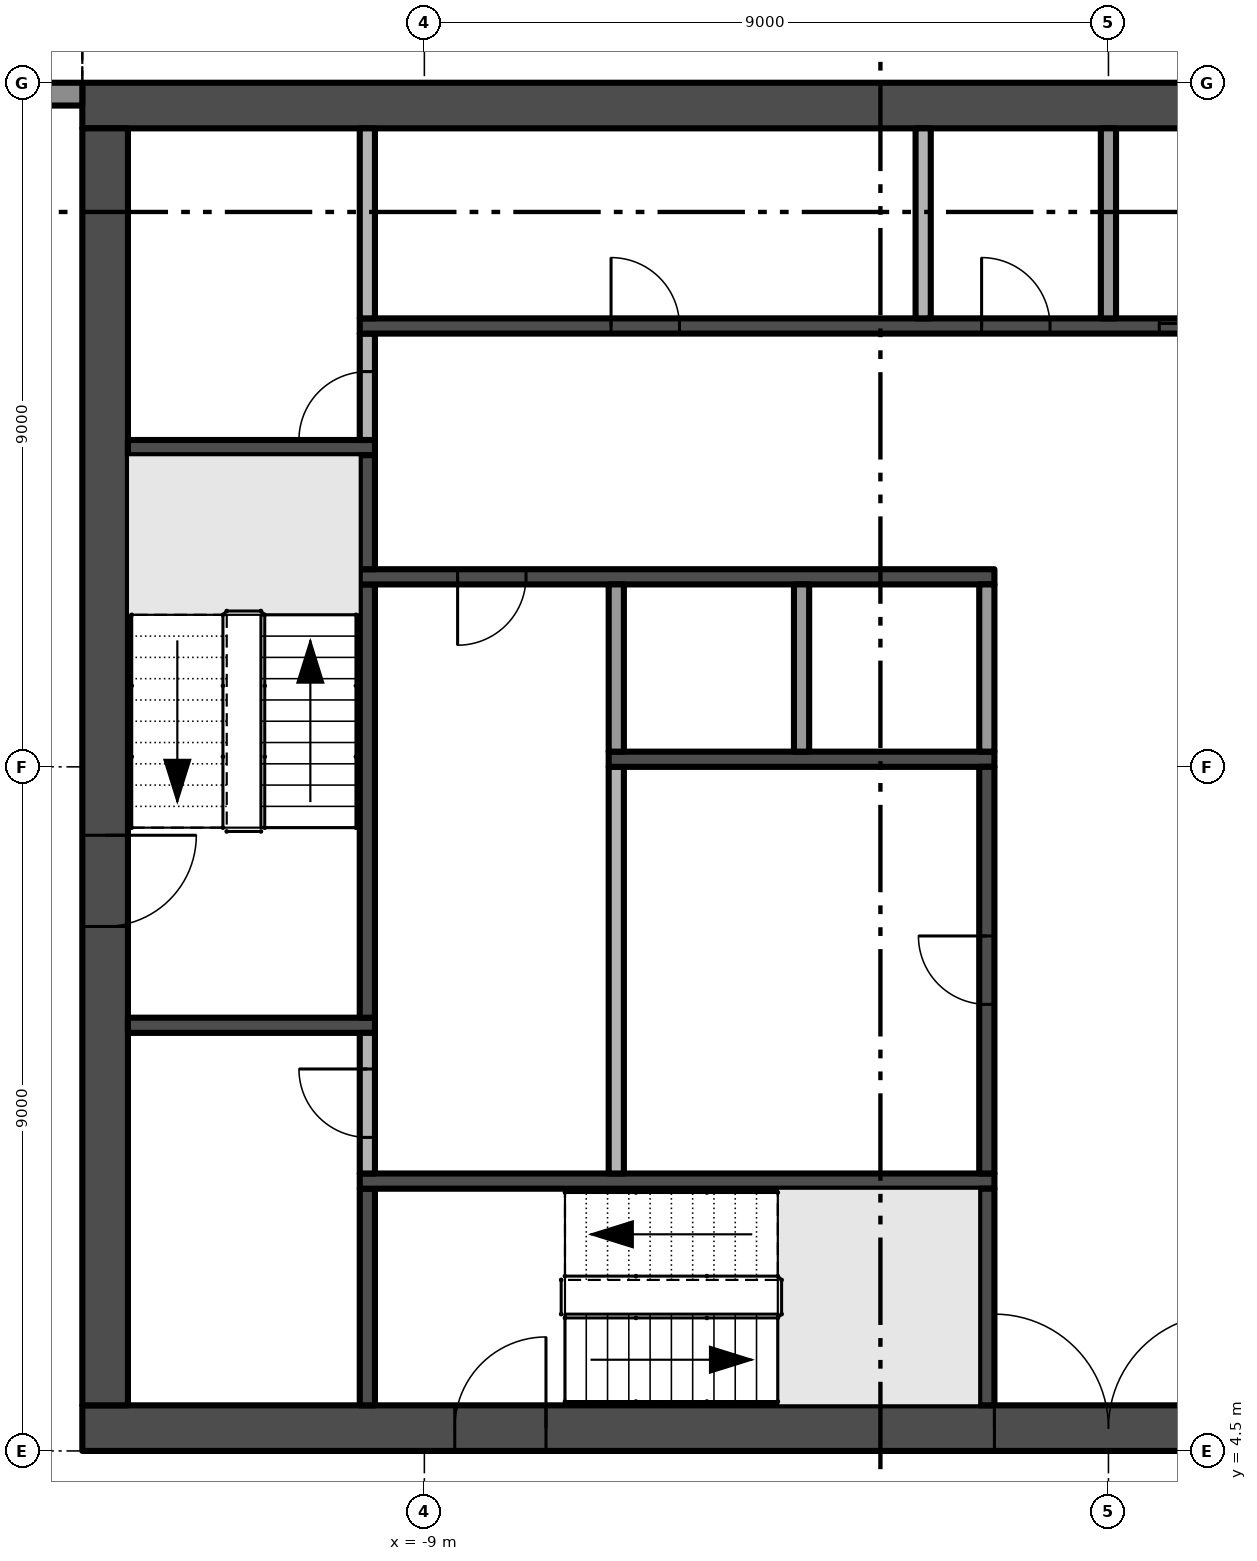
"""IFC4 building model, lengths in metres.
Left out: names, types, materials, properties, quantities, classifications, styles, units other than length and angle.
Written with IfcOpenShell. Run it as: python <this file> out.ifc"""

import sys

from ifc_helpers import new_model, si_unit, direction, frame, frame_2d, origin, place, context, subcontext, project, spatial, polyline, rectangle, outline, extrude, element, fill, save


model = new_model("IFC4")
c1 = context("Model", 3, precision=1e-05, world=origin(), true_north=direction((0.0, 1.0)))
c2 = subcontext(c1, "Body", "Model", "MODEL_VIEW")
j1 = project(units=[si_unit("LENGTHUNIT", "METRE"), si_unit("PLANEANGLEUNIT", "RADIAN")], contexts=[c1])
p1 = place(None, origin())
s1 = spatial("IfcSite", under=j1, at=p1, CompositionType="ELEMENT")
p2 = place(p1, origin())
s2 = spatial("IfcBuilding", under=s1, at=p2, CompositionType="ELEMENT")
p3 = place(p2, frame((0.0, 0.0, 184.4)))
s3 = spatial("IfcBuildingStorey", under=s2, at=p3, CompositionType="ELEMENT", Elevation=184.4)
p4 = place(p3, frame((-13.5, 4.8, -0.3), z_axis=(0.0, 0.0, 1.0), x_axis=(1.0, 0.0, 0.0)))
e1 = element("IfcWall", 1, at=p4, inside=s3, PredefinedType="SHEAR", context=c2, shape_type="SweptSolid", body=[
    extrude(rectangle(XDim=27.0, YDim=0.6, at=frame_2d((13.5, 0.0))), origin(), (0.0, 0.0, 1.0), 3.8),
])
p5 = place(p4, frame((12.0, 0.0, 0.3)))
e2 = element("IfcOpeningElement", 2, at=p5, cuts=e1, PredefinedType="OPENING", context=c2, shape_type="SweptSolid", body=[
    extrude(rectangle(XDim=3.0, YDim=2.4, at=frame_2d((1.5, 1.2))), frame((0.0, 0.31, 0.0), z_axis=(0.0, -1.0, 0.0), x_axis=(1.0, 0.0, 0.0)), (0.0, 0.0, 1.0), 0.62),
])
p6 = place(p4, frame((4.9, 0.0, 0.3)))
e3 = element("IfcOpeningElement", 3, at=p6, cuts=e1, PredefinedType="OPENING", context=c2, shape_type="SweptSolid", body=[
    extrude(rectangle(XDim=1.2, YDim=2.2, at=frame_2d((0.6, 1.1))), frame((0.0, 0.31, 0.0), z_axis=(0.0, -1.0, 0.0), x_axis=(1.0, 0.0, 0.0)), (0.0, 0.0, 1.0), 0.62),
])
p7 = place(p4, frame((20.75, 0.0, 0.3)))
e4 = element("IfcOpeningElement", 4, at=p7, cuts=e1, PredefinedType="OPENING", context=c2, shape_type="SweptSolid", body=[
    extrude(rectangle(XDim=1.5, YDim=2.2, at=frame_2d((0.75, 1.1))), frame((0.0, 0.31, 0.0), z_axis=(0.0, -1.0, 0.0), x_axis=(1.0, 0.0, 0.0)), (0.0, 0.0, 1.0), 0.62),
])
p8 = place(p4, frame((17.4, 0.0, 0.3)))
e5 = element("IfcOpeningElement", 5, at=p8, cuts=e1, PredefinedType="OPENING", context=c2, shape_type="SweptSolid", body=[
    extrude(rectangle(XDim=1.2, YDim=2.2, at=frame_2d((0.6, 1.1))), frame((0.0, 0.31, 0.0), z_axis=(0.0, -1.0, 0.0), x_axis=(1.0, 0.0, 0.0)), (0.0, 0.0, 1.0), 0.62),
])
p9 = place(p3, frame((13.5, 22.2, -0.3), z_axis=(0.0, 0.0, 1.0), x_axis=(-1.0, 0.0, 0.0)))
e6 = element("IfcWall", 6, at=p9, inside=s3, PredefinedType="SHEAR", context=c2, shape_type="SweptSolid", body=[
    extrude(rectangle(XDim=27.0, YDim=0.6, at=frame_2d((13.5, 0.0))), origin(), (0.0, 0.0, 1.0), 3.8),
])
p10 = place(p3, frame((-13.2, 21.9, -0.3), z_axis=(0.0, 0.0, 1.0), x_axis=(0.0, -1.0, 0.0)))
e7 = element("IfcWall", 7, at=p10, inside=s3, PredefinedType="SHEAR", context=c2, shape_type="SweptSolid", body=[
    extrude(rectangle(XDim=16.8, YDim=0.6, at=frame_2d((8.4, 0.0))), origin(), (0.0, 0.0, 1.0), 3.8),
])
p11 = place(p10, frame((9.3, 0.0, 0.3)))
e8 = element("IfcOpeningElement", 8, at=p11, cuts=e7, PredefinedType="OPENING", context=c2, shape_type="SweptSolid", body=[
    extrude(rectangle(XDim=1.2, YDim=2.2, at=frame_2d((0.6, 1.1))), frame((0.0, 0.31, 0.0), z_axis=(0.0, -1.0, 0.0), x_axis=(1.0, 0.0, 0.0)), (0.0, 0.0, 1.0), 0.62),
])
p12 = place(p3, frame((-17.475, 22.35, 0.0), z_axis=(0.0, 0.0, 1.0), x_axis=(1.0, 0.0, 0.0)))
e9 = element("IfcWall", 9, at=p12, inside=s3, PredefinedType="SOLIDWALL", context=c2, shape_type="SweptSolid", body=[
    extrude(rectangle(XDim=3.975, YDim=0.3, at=frame_2d((1.988, 0.0))), origin(), (0.0, 0.0, 1.0), 3.5),
])
p13 = place(p12, frame((0.325, 0.0, 0.0)))
e10 = element("IfcOpeningElement", 10, at=p13, cuts=e9, PredefinedType="OPENING", context=c2, shape_type="SweptSolid", body=[
    extrude(rectangle(XDim=3.025, YDim=2.4, at=frame_2d((1.512, 1.2))), frame((0.0, 0.16, 0.0), z_axis=(0.0, -1.0, 0.0), x_axis=(1.0, 0.0, 0.0)), (0.0, 0.0, 1.0), 0.32),
])
p14 = place(p3, origin())
e11 = element("IfcWall", 11, at=p14, inside=s3, PredefinedType="USERDEFINED", context=c2, shape_type="SweptSolid", body=[
    extrude(outline(polyline([(-13.5, 25.149), (-15.0, 25.485), (-15.375, 25.5), (-16.5, 25.369), (-18.0, 24.845), (-19.5, 24.112), (-21.0, 23.451), (-22.5, 23.115), (-22.445, 22.871), (-20.921, 23.213), (-19.395, 23.885), (-17.904, 24.614), (-16.444, 25.124), (-15.365, 25.249), (-15.033, 25.236), (-13.555, 24.905), (-13.5, 25.149)])), origin(), (0.0, 0.0, 1.0), 0.9),
])
for number, where, z_axis, x_axis in (
    (12, (-12.9, 10.1, 0.0), (0.0, 0.0, 1.0), (1.0, 0.0, 0.0)),
    (13, (-12.9, 17.7, 0.0), (0.0, 0.0, 1.0), (1.0, 0.0, 0.0)),
):
    element("IfcWall", number, at=place(p3, frame(where, z_axis=z_axis, x_axis=x_axis)), inside=s3, PredefinedType="SHEAR", context=c2, shape_type="SweptSolid", body=[
        extrude(rectangle(XDim=3.25, YDim=0.2, at=frame_2d((1.625, 0.0))), origin(), (0.0, 0.0, 1.0), 3.5),
    ])
p15 = place(p3, frame((-9.75, 5.1, 0.0), z_axis=(0.0, 0.0, 1.0), x_axis=(0.0, 1.0, 0.0)))
e14 = element("IfcWall", 14, at=p15, inside=s3, PredefinedType="SHEAR", context=c2, shape_type="SweptSolid", body=[
    extrude(rectangle(XDim=2.85, YDim=0.2, at=frame_2d((1.425, 0.0))), origin(), (0.0, 0.0, 1.0), 3.5),
])
p16 = place(p3, frame((-9.85, 8.05, 0.0), z_axis=(0.0, 0.0, 1.0), x_axis=(1.0, 0.0, 0.0)))
e15 = element("IfcWall", 15, at=p16, inside=s3, PredefinedType="SHEAR", context=c2, shape_type="SweptSolid", body=[
    extrude(rectangle(XDim=8.35, YDim=0.2, at=frame_2d((4.175, 0.0))), origin(), (0.0, 0.0, 1.0), 3.5),
])
p17 = place(p3, frame((-9.75, 8.15, 0.0), z_axis=(0.0, 0.0, 1.0), x_axis=(0.0, 1.0, 0.0)))
e16 = element("IfcWall", 16, at=p17, inside=s3, PredefinedType="PARTITIONING", context=c2, shape_type="SweptSolid", body=[
    extrude(rectangle(XDim=1.85, YDim=0.2, at=frame_2d((0.925, 0.0))), origin(), (0.0, 0.0, 1.0), 3.5),
])
p18 = place(p17, frame((0.475, 0.0, 0.0)))
e17 = element("IfcOpeningElement", 17, at=p18, cuts=e16, PredefinedType="OPENING", context=c2, shape_type="SweptSolid", body=[
    extrude(rectangle(XDim=0.9, YDim=2.1, at=frame_2d((0.45, 1.05))), frame((0.0, 0.11, 0.0), z_axis=(0.0, -1.0, 0.0), x_axis=(1.0, 0.0, 0.0)), (0.0, 0.0, 1.0), 0.22),
])
p19 = place(p3, frame((-9.75, 10.2, 0.0), z_axis=(0.0, 0.0, 1.0), x_axis=(0.0, 1.0, 0.0)))
e18 = element("IfcWall", 18, at=p19, inside=s3, PredefinedType="SHEAR", context=c2, shape_type="SweptSolid", body=[
    extrude(rectangle(XDim=5.7, YDim=0.2, at=frame_2d((2.85, 0.0))), origin(), (0.0, 0.0, 1.0), 3.5),
])
p20 = place(p3, frame((-1.5, 16.0, 0.0), z_axis=(0.0, 0.0, 1.0), x_axis=(-1.0, 0.0, 0.0)))
e19 = element("IfcWall", 19, at=p20, inside=s3, PredefinedType="SHEAR", context=c2, shape_type="SweptSolid", body=[
    extrude(rectangle(XDim=8.35, YDim=0.2, at=frame_2d((4.175, 0.0))), origin(), (0.0, 0.0, 1.0), 3.5),
])
p21 = place(p20, frame((6.162, 0.0, 0.0)))
e20 = element("IfcOpeningElement", 20, at=p21, cuts=e19, PredefinedType="OPENING", context=c2, shape_type="SweptSolid", body=[
    extrude(rectangle(XDim=0.9, YDim=2.1, at=frame_2d((0.45, 1.05))), frame((0.0, 0.11, 0.0), z_axis=(0.0, -1.0, 0.0), x_axis=(1.0, 0.0, 0.0)), (0.0, 0.0, 1.0), 0.22),
])
p22 = place(p3, frame((-9.75, 16.1, 0.0), z_axis=(0.0, 0.0, 1.0), x_axis=(0.0, 1.0, 0.0)))
e21 = element("IfcWall", 21, at=p22, inside=s3, PredefinedType="SHEAR", context=c2, shape_type="SweptSolid", body=[
    extrude(rectangle(XDim=1.5, YDim=0.2, at=frame_2d((0.75, 0.0))), origin(), (0.0, 0.0, 1.0), 3.5),
])
p23 = place(p3, frame((-9.75, 17.8, 0.0), z_axis=(0.0, 0.0, 1.0), x_axis=(0.0, 1.0, 0.0)))
e22 = element("IfcWall", 22, at=p23, inside=s3, PredefinedType="PARTITIONING", context=c2, shape_type="SweptSolid", body=[
    extrude(rectangle(XDim=1.4, YDim=0.2, at=frame_2d((0.7, 0.0))), origin(), (0.0, 0.0, 1.0), 3.5),
])
p24 = place(p23, origin())
e23 = element("IfcOpeningElement", 23, at=p24, cuts=e22, PredefinedType="OPENING", context=c2, shape_type="SweptSolid", body=[
    extrude(rectangle(XDim=0.9, YDim=2.1, at=frame_2d((0.45, 1.05))), frame((0.0, 0.11, 0.0), z_axis=(0.0, -1.0, 0.0), x_axis=(1.0, 0.0, 0.0)), (0.0, 0.0, 1.0), 0.22),
])
p25 = place(p3, frame((-9.85, 19.3, 0.0), z_axis=(0.0, 0.0, 1.0), x_axis=(1.0, 0.0, 0.0)))
e24 = element("IfcWall", 24, at=p25, inside=s3, PredefinedType="SHEAR", context=c2, shape_type="SweptSolid", body=[
    extrude(rectangle(XDim=19.7, YDim=0.2, at=frame_2d((9.85, 0.0))), origin(), (0.0, 0.0, 1.0), 3.5),
])
p26 = place(p25, frame((10.519, 0.0, 0.0)))
e25 = element("IfcOpeningElement", 25, at=p26, cuts=e24, PredefinedType="OPENING", context=c2, shape_type="SweptSolid", body=[
    extrude(rectangle(XDim=1.1, YDim=2.1, at=frame_2d((0.55, 1.05))), frame((0.0, 0.11, 0.0), z_axis=(0.0, -1.0, 0.0), x_axis=(1.0, 0.0, 0.0)), (0.0, 0.0, 1.0), 0.22),
])
p27 = place(p25, frame((12.956, 0.0, 0.0)))
e26 = element("IfcOpeningElement", 26, at=p27, cuts=e24, PredefinedType="OPENING", context=c2, shape_type="SweptSolid", body=[
    extrude(rectangle(XDim=1.1, YDim=2.1, at=frame_2d((0.55, 1.05))), frame((0.0, 0.11, 0.0), z_axis=(0.0, -1.0, 0.0), x_axis=(1.0, 0.0, 0.0)), (0.0, 0.0, 1.0), 0.22),
])
p28 = place(p25, frame((15.394, 0.0, 0.0)))
e27 = element("IfcOpeningElement", 27, at=p28, cuts=e24, PredefinedType="OPENING", context=c2, shape_type="SweptSolid", body=[
    extrude(rectangle(XDim=1.1, YDim=2.1, at=frame_2d((0.55, 1.05))), frame((0.0, 0.11, 0.0), z_axis=(0.0, -1.0, 0.0), x_axis=(1.0, 0.0, 0.0)), (0.0, 0.0, 1.0), 0.22),
])
p29 = place(p25, frame((17.831, 0.0, 0.0)))
e28 = element("IfcOpeningElement", 28, at=p29, cuts=e24, PredefinedType="OPENING", context=c2, shape_type="SweptSolid", body=[
    extrude(rectangle(XDim=1.1, YDim=2.1, at=frame_2d((0.55, 1.05))), frame((0.0, 0.11, 0.0), z_axis=(0.0, -1.0, 0.0), x_axis=(1.0, 0.0, 0.0)), (0.0, 0.0, 1.0), 0.22),
])
p30 = place(p25, frame((3.306, 0.0, 0.0)))
e29 = element("IfcOpeningElement", 29, at=p30, cuts=e24, PredefinedType="OPENING", context=c2, shape_type="SweptSolid", body=[
    extrude(rectangle(XDim=0.9, YDim=2.1, at=frame_2d((0.45, 1.05))), frame((0.0, 0.11, 0.0), z_axis=(0.0, -1.0, 0.0), x_axis=(1.0, 0.0, 0.0)), (0.0, 0.0, 1.0), 0.22),
])
p31 = place(p25, frame((8.181, 0.0, 0.0)))
e30 = element("IfcOpeningElement", 30, at=p31, cuts=e24, PredefinedType="OPENING", context=c2, shape_type="SweptSolid", body=[
    extrude(rectangle(XDim=0.9, YDim=2.1, at=frame_2d((0.45, 1.05))), frame((0.0, 0.11, 0.0), z_axis=(0.0, -1.0, 0.0), x_axis=(1.0, 0.0, 0.0)), (0.0, 0.0, 1.0), 0.22),
])
p32 = place(p3, frame((-9.75, 19.4, 0.0), z_axis=(0.0, 0.0, 1.0), x_axis=(0.0, 1.0, 0.0)))
e31 = element("IfcWall", 31, at=p32, inside=s3, PredefinedType="PARTITIONING", context=c2, shape_type="SweptSolid", body=[
    extrude(rectangle(XDim=2.5, YDim=0.2, at=frame_2d((1.25, 0.0))), origin(), (0.0, 0.0, 1.0), 3.5),
])
p33 = place(p3, frame((-6.475, 8.15, 0.0), z_axis=(0.0, 0.0, 1.0), x_axis=(0.0, 1.0, 0.0)))
e32 = element("IfcWall", 32, at=p33, inside=s3, PredefinedType="PARTITIONING", context=c2, shape_type="SweptSolid", body=[
    extrude(rectangle(XDim=5.35, YDim=0.2, at=frame_2d((2.675, 0.0))), origin(), (0.0, 0.0, 1.0), 3.5),
])
p34 = place(p3, frame((-6.575, 13.6, 0.0), z_axis=(0.0, 0.0, 1.0), x_axis=(1.0, 0.0, 0.0)))
e33 = element("IfcWall", 33, at=p34, inside=s3, PredefinedType="SHEAR", context=c2, shape_type="SweptSolid", body=[
    extrude(rectangle(XDim=5.075, YDim=0.2, at=frame_2d((2.538, 0.0))), origin(), (0.0, 0.0, 1.0), 3.5),
])
for number, where, z_axis, x_axis in (
    (34, (-6.475, 13.7, 0.0), (0.0, 0.0, 1.0), (0.0, 1.0, 0.0)),
    (35, (-4.037, 13.7, 0.0), (0.0, 0.0, 1.0), (0.0, 1.0, 0.0)),
):
    element("IfcWall", number, at=place(p3, frame(where, z_axis=z_axis, x_axis=x_axis)), inside=s3, PredefinedType="PARTITIONING", context=c2, shape_type="SweptSolid", body=[
        extrude(rectangle(XDim=2.2, YDim=0.2, at=frame_2d((1.1, 0.0))), origin(), (0.0, 0.0, 1.0), 3.5),
    ])
p35 = place(p3, frame((-2.438, 19.4, 0.0), z_axis=(0.0, 0.0, 1.0), x_axis=(0.0, 1.0, 0.0)))
e36 = element("IfcWall", 36, at=p35, inside=s3, PredefinedType="PARTITIONING", context=c2, shape_type="SweptSolid", body=[
    extrude(rectangle(XDim=2.5, YDim=0.2, at=frame_2d((1.25, 0.0))), origin(), (0.0, 0.0, 1.0), 3.5),
])
p36 = place(p3, frame((-1.6, 5.1, 0.0), z_axis=(0.0, 0.0, 1.0), x_axis=(0.0, 1.0, 0.0)))
e37 = element("IfcWall", 37, at=p36, inside=s3, PredefinedType="SHEAR", context=c2, shape_type="SweptSolid", body=[
    extrude(rectangle(XDim=2.85, YDim=0.2, at=frame_2d((1.425, 0.0))), origin(), (0.0, 0.0, 1.0), 3.5),
])
p37 = place(p3, frame((-1.6, 8.15, 0.0), z_axis=(0.0, 0.0, 1.0), x_axis=(0.0, 1.0, 0.0)))
e38 = element("IfcWall", 38, at=p37, inside=s3, PredefinedType="SHEAR", context=c2, shape_type="SweptSolid", body=[
    extrude(rectangle(XDim=5.35, YDim=0.2, at=frame_2d((2.675, 0.0))), origin(), (0.0, 0.0, 1.0), 3.5),
])
p38 = place(p37, frame((2.225, 0.0, 0.0)))
e39 = element("IfcOpeningElement", 39, at=p38, cuts=e38, PredefinedType="OPENING", context=c2, shape_type="SweptSolid", body=[
    extrude(rectangle(XDim=0.9, YDim=2.1, at=frame_2d((0.45, 1.05))), frame((0.0, 0.11, 0.0), z_axis=(0.0, -1.0, 0.0), x_axis=(1.0, 0.0, 0.0)), (0.0, 0.0, 1.0), 0.22),
])
p39 = place(p3, frame((-1.6, 13.7, 0.0), z_axis=(0.0, 0.0, 1.0), x_axis=(0.0, 1.0, 0.0)))
e40 = element("IfcWall", 40, at=p39, inside=s3, PredefinedType="PARTITIONING", context=c2, shape_type="SweptSolid", body=[
    extrude(rectangle(XDim=2.2, YDim=0.2, at=frame_2d((1.1, 0.0))), origin(), (0.0, 0.0, 1.0), 3.5),
])
p40 = place(p3, frame((0.0, 19.4, 0.0), z_axis=(0.0, 0.0, 1.0), x_axis=(0.0, 1.0, 0.0)))
e41 = element("IfcWall", 41, at=p40, inside=s3, PredefinedType="PARTITIONING", context=c2, shape_type="SweptSolid", body=[
    extrude(rectangle(XDim=2.5, YDim=0.2, at=frame_2d((1.25, 0.0))), origin(), (0.0, 0.0, 1.0), 3.5),
])
p41 = place(p5, frame((3.0, 0.0, 0.0), z_axis=(0.0, 0.0, 1.0), x_axis=(-1.0, 0.0, 0.0)))
e42 = element("IfcDoor", 42, at=p41, inside=s3, OperationType="DOUBLE_DOOR_SINGLE_SWING", PredefinedType="DOOR", context=c2, shape_type="SweptSolid", body=[
    extrude(rectangle(XDim=3.0, YDim=2.4, at=frame_2d((1.5, 1.2))), frame((0.0, 0.025, 0.0), z_axis=(0.0, -1.0, 0.0), x_axis=(1.0, 0.0, 0.0)), (0.0, 0.0, 1.0), 0.05),
])
fill(e2, e42)
p42 = place(p11, frame((1.2, 0.0, 0.0), z_axis=(0.0, 0.0, 1.0), x_axis=(-1.0, 0.0, 0.0)))
e43 = element("IfcDoor", 43, at=p42, inside=s3, OperationType="SINGLE_SWING_RIGHT", PredefinedType="DOOR", context=c2, shape_type="SweptSolid", body=[
    extrude(rectangle(XDim=1.2, YDim=2.2, at=frame_2d((0.6, 1.1))), frame((0.0, 0.025, 0.0), z_axis=(0.0, -1.0, 0.0), x_axis=(1.0, 0.0, 0.0)), (0.0, 0.0, 1.0), 0.05),
])
fill(e8, e43)
p43 = place(p6, frame((1.2, 0.0, 0.0), z_axis=(0.0, 0.0, 1.0), x_axis=(-1.0, 0.0, 0.0)))
e44 = element("IfcDoor", 44, at=p43, inside=s3, OperationType="SINGLE_SWING_LEFT", PredefinedType="DOOR", context=c2, shape_type="SweptSolid", body=[
    extrude(rectangle(XDim=1.2, YDim=2.2, at=frame_2d((0.6, 1.1))), frame((0.0, 0.025, 0.0), z_axis=(0.0, -1.0, 0.0), x_axis=(1.0, 0.0, 0.0)), (0.0, 0.0, 1.0), 0.05),
])
fill(e3, e44)
p44 = place(p26, origin())
e45 = element("IfcDoor", 45, at=p44, inside=s3, OperationType="SLIDING_TO_RIGHT", PredefinedType="DOOR", context=c2, shape_type="SweptSolid", body=[
    extrude(rectangle(XDim=1.1, YDim=2.1, at=frame_2d((0.55, 1.05))), frame((0.0, 0.025, 0.0), z_axis=(0.0, -1.0, 0.0), x_axis=(1.0, 0.0, 0.0)), (0.0, 0.0, 1.0), 0.05),
])
fill(e25, e45)
p45 = place(p21, origin())
e46 = element("IfcDoor", 46, at=p45, inside=s3, OperationType="SINGLE_SWING_RIGHT", PredefinedType="DOOR", context=c2, shape_type="SweptSolid", body=[
    extrude(rectangle(XDim=0.9, YDim=2.1, at=frame_2d((0.45, 1.05))), frame((0.0, 0.025, 0.0), z_axis=(0.0, -1.0, 0.0), x_axis=(1.0, 0.0, 0.0)), (0.0, 0.0, 1.0), 0.05),
])
fill(e20, e46)
p46 = place(p38, origin())
e47 = element("IfcDoor", 47, at=p46, inside=s3, OperationType="SINGLE_SWING_RIGHT", PredefinedType="DOOR", context=c2, shape_type="SweptSolid", body=[
    extrude(rectangle(XDim=0.9, YDim=2.1, at=frame_2d((0.45, 1.05))), frame((0.0, 0.025, 0.0), z_axis=(0.0, -1.0, 0.0), x_axis=(1.0, 0.0, 0.0)), (0.0, 0.0, 1.0), 0.05),
])
fill(e39, e47)
p47 = place(p24, origin())
e48 = element("IfcDoor", 48, at=p47, inside=s3, OperationType="SINGLE_SWING_LEFT", PredefinedType="DOOR", context=c2, shape_type="SweptSolid", body=[
    extrude(rectangle(XDim=0.9, YDim=2.1, at=frame_2d((0.45, 1.05))), frame((0.0, 0.025, 0.0), z_axis=(0.0, -1.0, 0.0), x_axis=(1.0, 0.0, 0.0)), (0.0, 0.0, 1.0), 0.05),
])
fill(e23, e48)
p48 = place(p30, origin())
e49 = element("IfcDoor", 49, at=p48, inside=s3, OperationType="SINGLE_SWING_LEFT", PredefinedType="DOOR", context=c2, shape_type="SweptSolid", body=[
    extrude(rectangle(XDim=0.9, YDim=2.1, at=frame_2d((0.45, 1.05))), frame((0.0, 0.025, 0.0), z_axis=(0.0, -1.0, 0.0), x_axis=(1.0, 0.0, 0.0)), (0.0, 0.0, 1.0), 0.05),
])
fill(e29, e49)
p49 = place(p31, origin())
e50 = element("IfcDoor", 50, at=p49, inside=s3, OperationType="SINGLE_SWING_LEFT", PredefinedType="DOOR", context=c2, shape_type="SweptSolid", body=[
    extrude(rectangle(XDim=0.9, YDim=2.1, at=frame_2d((0.45, 1.05))), frame((0.0, 0.025, 0.0), z_axis=(0.0, -1.0, 0.0), x_axis=(1.0, 0.0, 0.0)), (0.0, 0.0, 1.0), 0.05),
])
fill(e30, e50)
p50 = place(p18, origin())
e51 = element("IfcDoor", 51, at=p50, inside=s3, OperationType="SINGLE_SWING_RIGHT", PredefinedType="DOOR", context=c2, shape_type="SweptSolid", body=[
    extrude(rectangle(XDim=0.9, YDim=2.1, at=frame_2d((0.45, 1.05))), frame((0.0, 0.025, 0.0), z_axis=(0.0, -1.0, 0.0), x_axis=(1.0, 0.0, 0.0)), (0.0, 0.0, 1.0), 0.05),
])
fill(e17, e51)
save(model, sys.argv[1])
